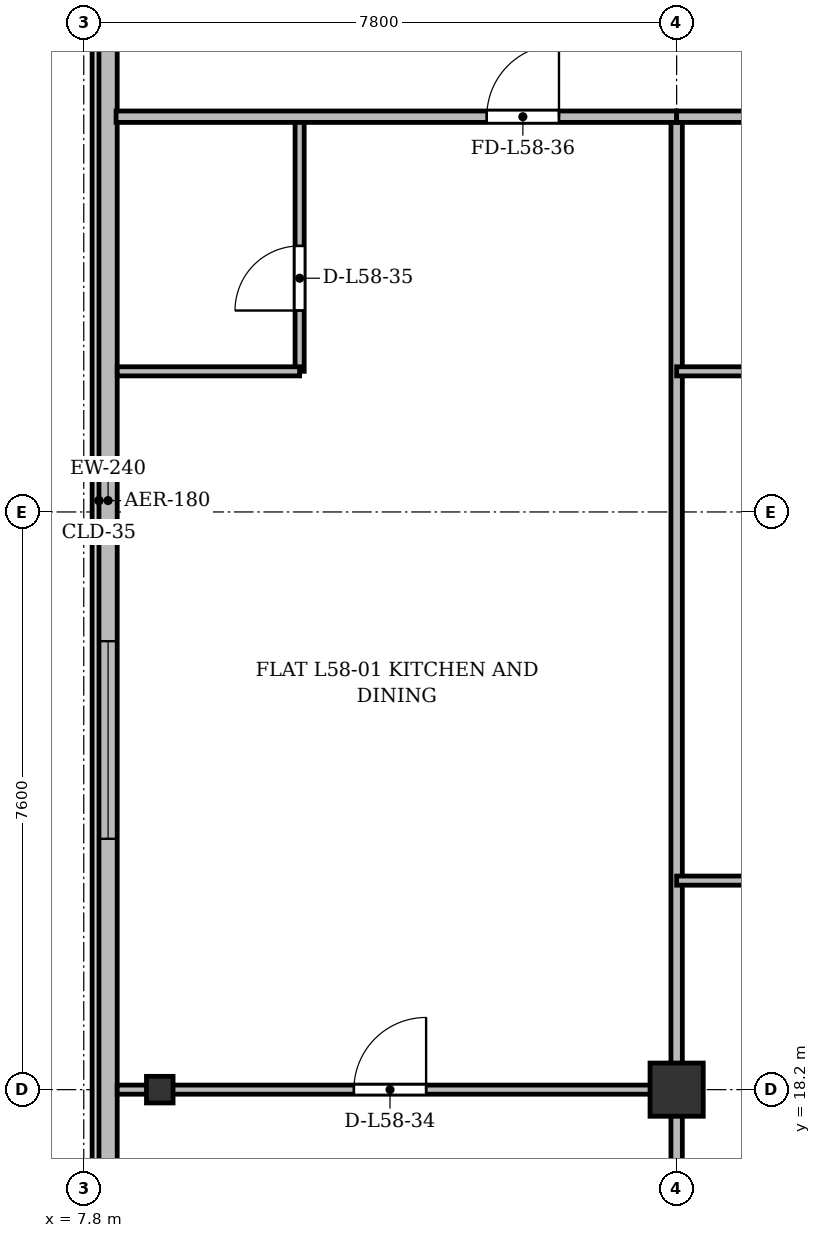
"""IFC4 building model, lengths in metres.
Left out: names, types, materials, properties, quantities, classifications, styles, units other than length and angle.
Written with IfcOpenShell. Run it as: python <this file> out.ifc"""

import sys

from ifc_helpers import new_model, si_unit, direction, frame, frame_2d, origin, origin_2d, place, context, subcontext, project, spatial, rectangle, i_section, extrude, source, transform, mapped, element, fill, save


model = new_model("IFC4")
c1 = context("Model", 3, precision=1e-05, world=origin(), true_north=direction((0.0, 1.0)))
c2 = subcontext(c1, "Body", "Model", "MODEL_VIEW")
j1 = project(units=[si_unit("LENGTHUNIT", "METRE"), si_unit("PLANEANGLEUNIT", "RADIAN")], contexts=[c1])
p1 = place(None, origin())
s1 = spatial("IfcSite", under=j1, at=p1, CompositionType="ELEMENT")
p2 = place(p1, origin())
s2 = spatial("IfcBuilding", under=s1, at=p2, CompositionType="ELEMENT")
p3 = place(p2, frame((0.0, 0.0, 222.9)))
s3 = spatial("IfcBuildingStorey", under=s2, at=p3, CompositionType="ELEMENT", Elevation=222.9)
m1 = source(origin(), c2, "Body", "SweptSolid", [
    extrude(i_section(OverallWidth=0.35, OverallDepth=0.35, WebThickness=0.018, FlangeThickness=0.028, at=origin_2d()), origin(), (0.0, 0.0, 1.0), 3.6),
])
p4 = place(p3, frame((8.8, 18.2, 0.0), z_axis=(0.0, 0.0, 1.0), x_axis=(1.0, 0.0, 0.0)))
e1 = element("IfcColumn", 1, at=p4, inside=s3, PredefinedType="COLUMN", context=c2, shape_type="MappedRepresentation", body=[
    mapped(m1, transform((0.0, 0.0, 0.0), x_axis=(1.0, 0.0, 0.0), y_axis=(0.0, 1.0, 0.0), z_axis=(0.0, 0.0, 1.0), scale=1.0)),
])
m2 = source(origin(), c2, "Body", "SweptSolid", [
    extrude(rectangle(XDim=0.7, YDim=0.7, at=origin_2d()), origin(), (0.0, 0.0, 1.0), 3.6),
])
p5 = place(p3, frame((15.6, 18.2, 0.0), z_axis=(0.0, 0.0, 1.0), x_axis=(1.0, 0.0, 0.0)))
e2 = element("IfcColumn", 2, at=p5, inside=s3, PredefinedType="COLUMN", context=c2, shape_type="MappedRepresentation", body=[
    mapped(m2, transform((0.0, 0.0, 0.0), x_axis=(1.0, 0.0, 0.0), y_axis=(0.0, 1.0, 0.0), z_axis=(0.0, 0.0, 1.0), scale=1.0)),
])
p6 = place(p3, frame((8.12, 6.4, 0.0), z_axis=(0.0, 0.0, 1.0), x_axis=(0.0, 1.0, 0.0)))
e3 = element("IfcWall", 3, at=p6, inside=s3, PredefinedType="SOLIDWALL", context=c2, shape_type="SweptSolid", body=[
    extrude(rectangle(XDim=39.1, YDim=0.24, at=frame_2d((19.55, 0.0))), origin(), (0.0, 0.0, 1.0), 3.36),
])
p7 = place(p6, frame((1.45, 0.0, 0.92)))
e4 = element("IfcOpeningElement", 4, at=p7, cuts=e3, PredefinedType="OPENING", context=c2, shape_type="SweptSolid", body=[
    extrude(rectangle(XDim=1.2, YDim=1.65, at=frame_2d((0.6, 0.825))), frame((0.0, 0.13, 0.0), z_axis=(0.0, -1.0, 0.0), x_axis=(1.0, 0.0, 0.0)), (0.0, 0.0, 1.0), 0.26),
])
p8 = place(p6, frame((3.7, 0.0, 0.92)))
e5 = element("IfcOpeningElement", 5, at=p8, cuts=e3, PredefinedType="OPENING", context=c2, shape_type="SweptSolid", body=[
    extrude(rectangle(XDim=2.6, YDim=1.9, at=frame_2d((1.3, 0.95))), frame((0.0, 0.13, 0.0), z_axis=(0.0, -1.0, 0.0), x_axis=(1.0, 0.0, 0.0)), (0.0, 0.0, 1.0), 0.26),
])
p9 = place(p6, frame((7.9, 0.0, 0.92)))
e6 = element("IfcOpeningElement", 6, at=p9, cuts=e3, PredefinedType="OPENING", context=c2, shape_type="SweptSolid", body=[
    extrude(rectangle(XDim=2.6, YDim=1.9, at=frame_2d((1.3, 0.95))), frame((0.0, 0.13, 0.0), z_axis=(0.0, -1.0, 0.0), x_axis=(1.0, 0.0, 0.0)), (0.0, 0.0, 1.0), 0.26),
])
p10 = place(p6, frame((15.1, 0.0, 0.92)))
e7 = element("IfcOpeningElement", 7, at=p10, cuts=e3, PredefinedType="OPENING", context=c2, shape_type="SweptSolid", body=[
    extrude(rectangle(XDim=2.6, YDim=1.9, at=frame_2d((1.3, 0.95))), frame((0.0, 0.13, 0.0), z_axis=(0.0, -1.0, 0.0), x_axis=(1.0, 0.0, 0.0)), (0.0, 0.0, 1.0), 0.26),
])
p11 = place(p6, frame((33.4, 0.0, 0.92)))
e8 = element("IfcOpeningElement", 8, at=p11, cuts=e3, PredefinedType="OPENING", context=c2, shape_type="SweptSolid", body=[
    extrude(rectangle(XDim=1.2, YDim=1.65, at=frame_2d((0.6, 0.825))), frame((0.0, 0.13, 0.0), z_axis=(0.0, -1.0, 0.0), x_axis=(1.0, 0.0, 0.0)), (0.0, 0.0, 1.0), 0.26),
])
p12 = place(p6, frame((36.75, 0.0, 0.92)))
e9 = element("IfcOpeningElement", 9, at=p12, cuts=e3, PredefinedType="OPENING", context=c2, shape_type="SweptSolid", body=[
    extrude(rectangle(XDim=1.2, YDim=1.65, at=frame_2d((0.6, 0.825))), frame((0.0, 0.13, 0.0), z_axis=(0.0, -1.0, 0.0), x_axis=(1.0, 0.0, 0.0)), (0.0, 0.0, 1.0), 0.26),
])
p13 = place(p3, frame((15.6, 3.625, 0.0), z_axis=(0.0, 0.0, 1.0), x_axis=(0.0, 1.0, 0.0)))
e10 = element("IfcWall", 10, at=p13, inside=s3, PredefinedType="PARTITIONING", context=c2, shape_type="SweptSolid", body=[
    extrude(rectangle(XDim=27.375, YDim=0.15, at=frame_2d((13.688, 0.0))), origin(), (0.0, 0.0, 1.0), 2.86),
])
p14 = place(p3, frame((8.24, 18.2, 0.0), z_axis=(0.0, 0.0, 1.0), x_axis=(1.0, 0.0, 0.0)))
e11 = element("IfcWall", 11, at=p14, inside=s3, PredefinedType="PARTITIONING", context=c2, shape_type="SweptSolid", body=[
    extrude(rectangle(XDim=7.36, YDim=0.12, at=frame_2d((3.68, 0.0))), origin(), (0.0, 0.0, 1.0), 2.91),
])
p15 = place(p14, frame((3.114, 0.0, 0.0)))
e12 = element("IfcOpeningElement", 12, at=p15, cuts=e11, PredefinedType="OPENING", context=c2, shape_type="SweptSolid", body=[
    extrude(rectangle(XDim=0.95, YDim=2.15, at=frame_2d((0.475, 1.075))), frame((0.0, 0.07, 0.0), z_axis=(0.0, -1.0, 0.0), x_axis=(1.0, 0.0, 0.0)), (0.0, 0.0, 1.0), 0.14),
])
p16 = place(p3, frame((10.64, 27.65, 0.0), z_axis=(0.0, 0.0, 1.0), x_axis=(0.0, 1.0, 0.0)))
e13 = element("IfcWall", 13, at=p16, inside=s3, PredefinedType="PARTITIONING", context=c2, shape_type="SweptSolid", body=[
    extrude(rectangle(XDim=3.35, YDim=0.12, at=frame_2d((1.675, 0.0))), origin(), (0.0, 0.0, 1.0), 3.36),
])
p17 = place(p16, frame((0.8, 0.0, 0.0)))
e14 = element("IfcOpeningElement", 14, at=p17, cuts=e13, PredefinedType="OPENING", context=c2, shape_type="SweptSolid", body=[
    extrude(rectangle(XDim=0.85, YDim=2.1, at=frame_2d((0.425, 1.05))), frame((0.0, 0.07, 0.0), z_axis=(0.0, -1.0, 0.0), x_axis=(1.0, 0.0, 0.0)), (0.0, 0.0, 1.0), 0.14),
])
p18 = place(p3, frame((8.24, 27.65, 0.0), z_axis=(0.0, 0.0, 1.0), x_axis=(1.0, 0.0, 0.0)))
e15 = element("IfcWall", 15, at=p18, inside=s3, PredefinedType="PARTITIONING", context=c2, shape_type="SweptSolid", body=[
    extrude(rectangle(XDim=2.4, YDim=0.12, at=frame_2d((1.2, 0.0))), origin(), (0.0, 0.0, 1.0), 2.86),
])
p19 = place(p3, frame((8.225, 31.0, 0.0), z_axis=(0.0, 0.0, 1.0), x_axis=(1.0, 0.0, 0.0)))
e16 = element("IfcWall", 16, at=p19, inside=s3, PredefinedType="PARTITIONING", context=c2, shape_type="SweptSolid", body=[
    extrude(rectangle(XDim=7.375, YDim=0.15, at=frame_2d((3.688, 0.0))), origin(), (0.0, 0.0, 1.0), 2.86),
])
p20 = place(p19, frame((4.877, 0.0, 0.0)))
e17 = element("IfcOpeningElement", 17, at=p20, cuts=e16, PredefinedType="OPENING", context=c2, shape_type="SweptSolid", body=[
    extrude(rectangle(XDim=0.95, YDim=2.15, at=frame_2d((0.475, 1.075))), frame((0.0, 0.085, 0.0), z_axis=(0.0, -1.0, 0.0), x_axis=(1.0, 0.0, 0.0)), (0.0, 0.0, 1.0), 0.17),
])
p21 = place(p3, frame((15.6, 20.95, 0.0), z_axis=(0.0, 0.0, 1.0), x_axis=(1.0, 0.0, 0.0)))
e18 = element("IfcWall", 18, at=p21, inside=s3, PredefinedType="PARTITIONING", context=c2, shape_type="SweptSolid", body=[
    extrude(rectangle(XDim=7.8, YDim=0.12, at=frame_2d((3.9, 0.0))), origin(), (0.0, 0.0, 1.0), 2.86),
])
p22 = place(p21, frame((3.333, 0.0, 0.0)))
e19 = element("IfcOpeningElement", 19, at=p22, cuts=e18, PredefinedType="OPENING", context=c2, shape_type="SweptSolid", body=[
    extrude(rectangle(XDim=0.95, YDim=2.15, at=frame_2d((0.475, 1.075))), frame((0.0, 0.07, 0.0), z_axis=(0.0, -1.0, 0.0), x_axis=(1.0, 0.0, 0.0)), (0.0, 0.0, 1.0), 0.14),
])
p23 = place(p3, frame((15.6, 27.65, 0.0), z_axis=(0.0, 0.0, 1.0), x_axis=(1.0, 0.0, 0.0)))
e20 = element("IfcWall", 20, at=p23, inside=s3, PredefinedType="PARTITIONING", context=c2, shape_type="SweptSolid", body=[
    extrude(rectangle(XDim=2.4, YDim=0.12, at=frame_2d((1.2, 0.0))), origin(), (0.0, 0.0, 1.0), 2.86),
])
p24 = place(p3, frame((15.6, 31.0, 0.0), z_axis=(0.0, 0.0, 1.0), x_axis=(1.0, 0.0, 0.0)))
e21 = element("IfcWall", 21, at=p24, inside=s3, PredefinedType="PARTITIONING", context=c2, shape_type="SweptSolid", body=[
    extrude(rectangle(XDim=7.8, YDim=0.15, at=frame_2d((3.9, 0.0))), origin(), (0.0, 0.0, 1.0), 2.86),
])
p25 = place(p24, frame((5.172, 0.0, 0.0)))
e22 = element("IfcOpeningElement", 22, at=p25, cuts=e21, PredefinedType="OPENING", context=c2, shape_type="SweptSolid", body=[
    extrude(rectangle(XDim=0.95, YDim=2.15, at=frame_2d((0.475, 1.075))), frame((0.0, 0.085, 0.0), z_axis=(0.0, -1.0, 0.0), x_axis=(1.0, 0.0, 0.0)), (0.0, 0.0, 1.0), 0.17),
])
m3 = source(origin(), c2, "Body", "SweptSolid", [
    extrude(rectangle(XDim=2.6, YDim=1.9, at=frame_2d((1.3, 0.95))), frame((0.0, 0.03, 0.0), z_axis=(0.0, -1.0, 0.0), x_axis=(1.0, 0.0, 0.0)), (0.0, 0.0, 1.0), 0.06),
])
p26 = place(p10, origin())
e23 = element("IfcWindow", 23, at=p26, inside=s3, PartitioningType="SINGLE_PANEL", PredefinedType="WINDOW", context=c2, shape_type="MappedRepresentation", body=[
    mapped(m3, transform((0.0, 0.0, 0.0), x_axis=(1.0, 0.0, 0.0), y_axis=(0.0, 1.0, 0.0), z_axis=(0.0, 0.0, 1.0), scale=1.0)),
])
fill(e7, e23)
m4 = source(origin(), c2, "Body", "SweptSolid", [
    extrude(rectangle(XDim=0.95, YDim=2.15, at=frame_2d((0.475, 1.075))), frame((0.0, 0.025, 0.0), z_axis=(0.0, -1.0, 0.0), x_axis=(1.0, 0.0, 0.0)), (0.0, 0.0, 1.0), 0.05),
])
p27 = place(p15, origin())
e24 = element("IfcDoor", 24, at=p27, inside=s3, OperationType="SINGLE_SWING_RIGHT", PredefinedType="DOOR", context=c2, shape_type="MappedRepresentation", body=[
    mapped(m4, transform((0.0, 0.0, 0.0), x_axis=(1.0, 0.0, 0.0), y_axis=(0.0, 1.0, 0.0), z_axis=(0.0, 0.0, 1.0), scale=1.0)),
])
fill(e12, e24)
m5 = source(origin(), c2, "Body", "SweptSolid", [
    extrude(rectangle(XDim=0.85, YDim=2.1, at=frame_2d((0.425, 1.05))), frame((0.0, 0.025, 0.0), z_axis=(0.0, -1.0, 0.0), x_axis=(1.0, 0.0, 0.0)), (0.0, 0.0, 1.0), 0.05),
])
p28 = place(p17, origin())
e25 = element("IfcDoor", 25, at=p28, inside=s3, OperationType="SINGLE_SWING_LEFT", PredefinedType="DOOR", context=c2, shape_type="MappedRepresentation", body=[
    mapped(m5, transform((0.0, 0.0, 0.0), x_axis=(1.0, 0.0, 0.0), y_axis=(0.0, 1.0, 0.0), z_axis=(0.0, 0.0, 1.0), scale=1.0)),
])
fill(e14, e25)
p29 = place(p20, origin())
e26 = element("IfcDoor", 26, at=p29, inside=s3, OperationType="SINGLE_SWING_RIGHT", PredefinedType="DOOR", context=c2, shape_type="MappedRepresentation", body=[
    mapped(m4, transform((0.0, 0.0, 0.0), x_axis=(1.0, 0.0, 0.0), y_axis=(0.0, 1.0, 0.0), z_axis=(0.0, 0.0, 1.0), scale=1.0)),
])
fill(e17, e26)
save(model, sys.argv[1])
